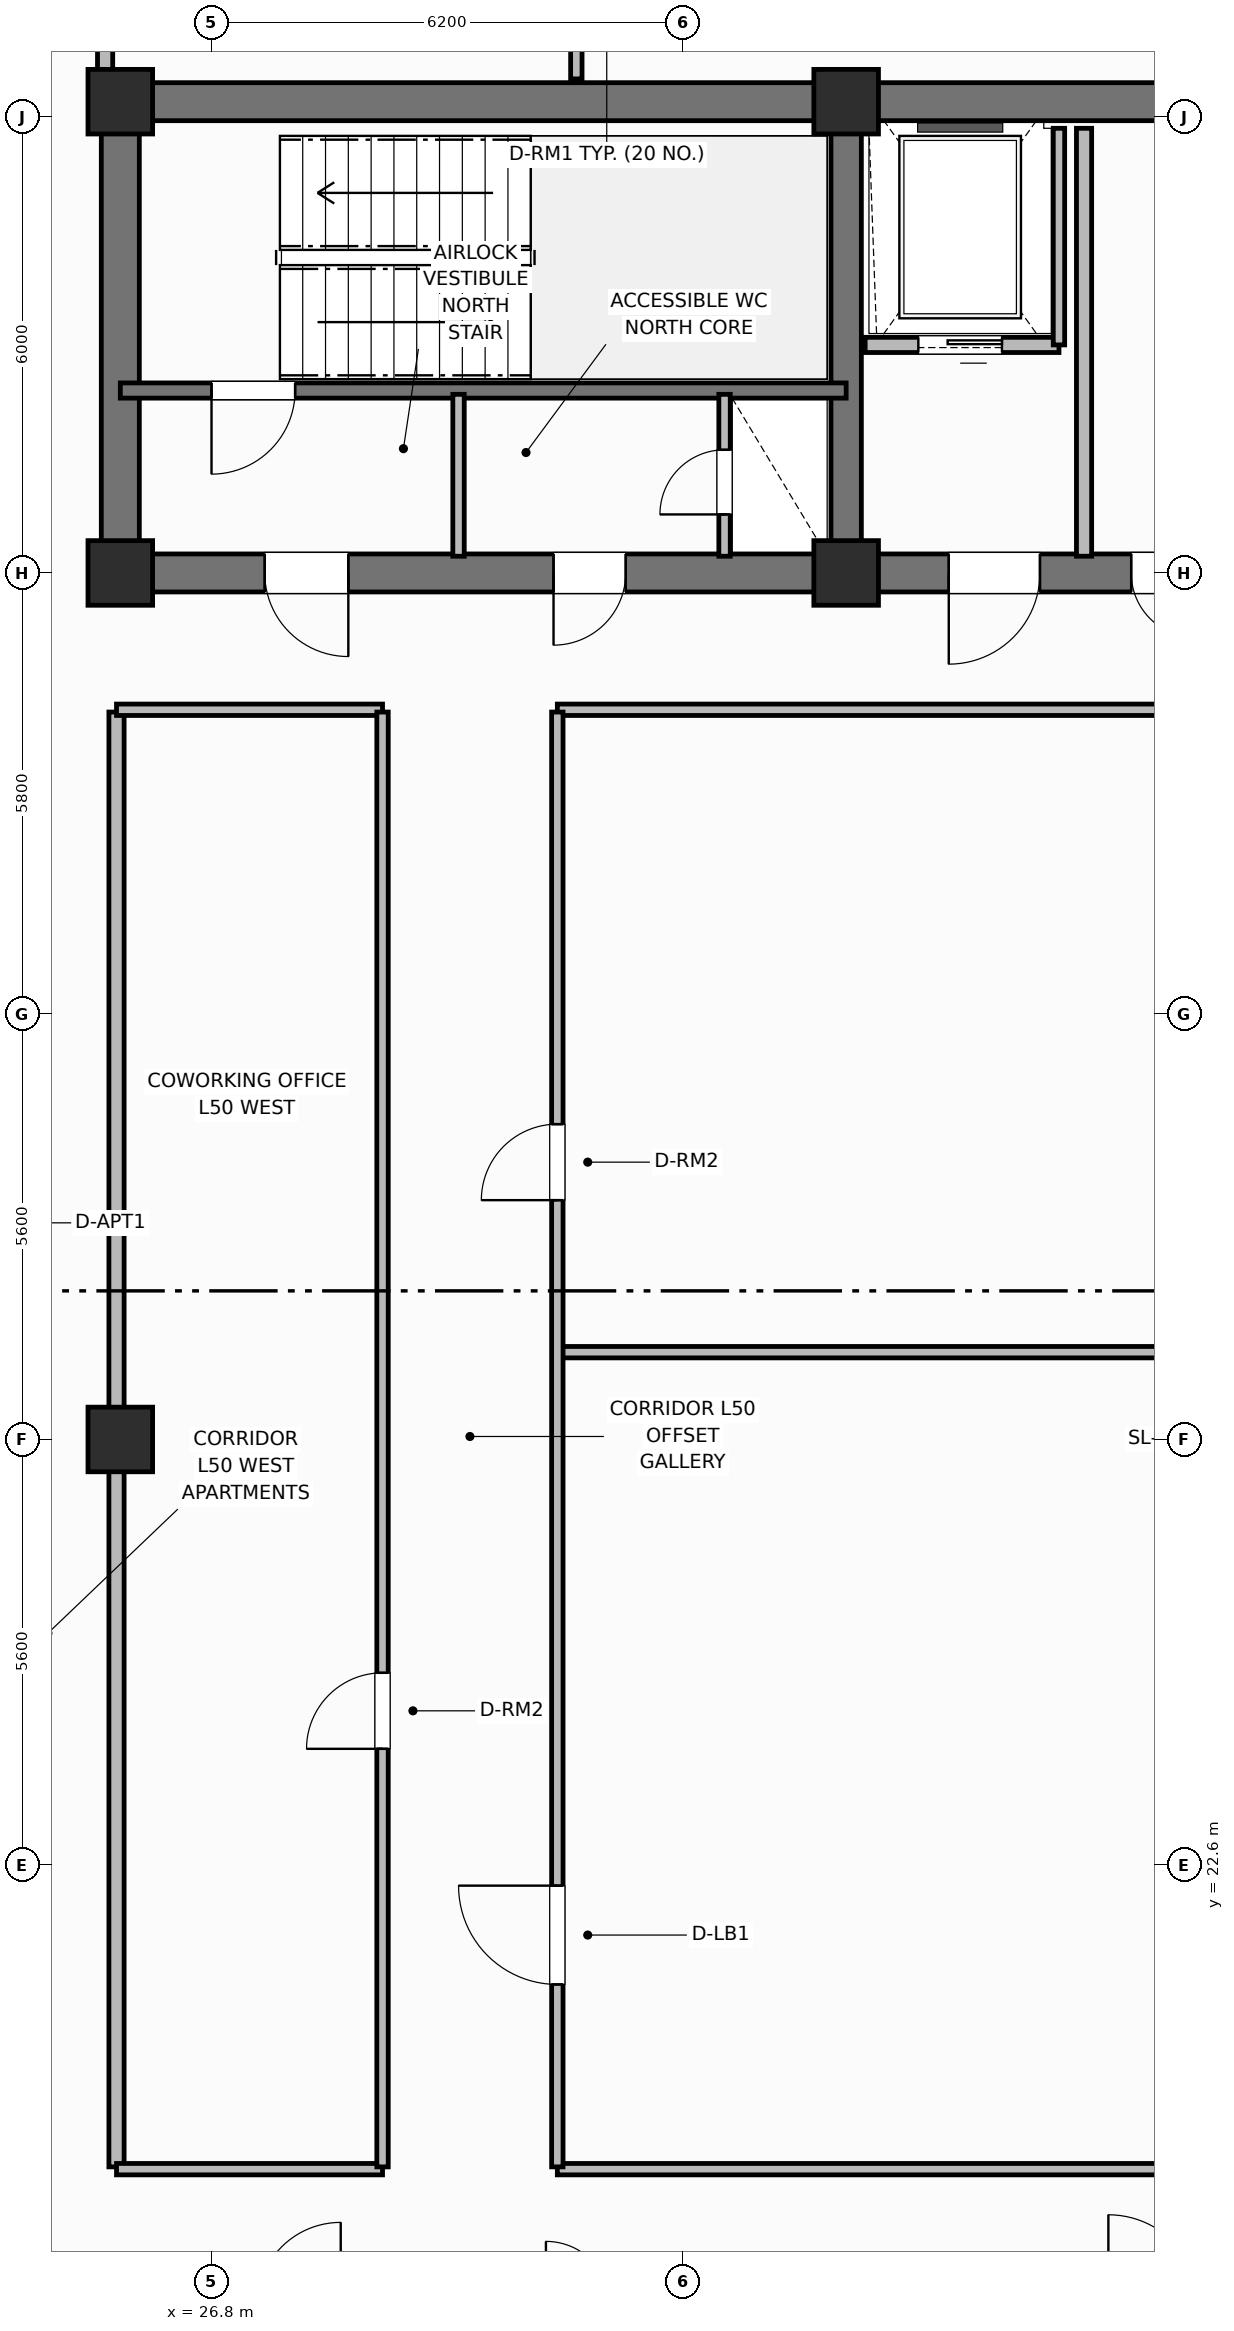
"""IFC4 building model, lengths in metres.
Left out: names, types, materials, properties, quantities, classifications, styles, units other than length and angle.
Written with IfcOpenShell. Run it as: python <this file> out.ifc"""

import sys

from ifc_helpers import new_model, si_unit, direction, frame, frame_2d, origin, origin_2d, place, context, subcontext, project, spatial, rectangle, extrude, element, fill, save


model = new_model("IFC4")
c1 = context("Model", 3, precision=1e-05, world=origin(), true_north=direction((0.0, 1.0)))
c2 = subcontext(c1, "Body", "Model", "MODEL_VIEW")
j1 = project(units=[si_unit("LENGTHUNIT", "METRE"), si_unit("PLANEANGLEUNIT", "RADIAN")], contexts=[c1])
p1 = place(None, origin())
s1 = spatial("IfcSite", under=j1, at=p1, CompositionType="ELEMENT")
p2 = place(p1, origin())
s2 = spatial("IfcBuilding", under=s1, at=p2, CompositionType="ELEMENT")
p3 = place(p2, frame((0.0, 0.0, 203.1)))
s3 = spatial("IfcBuildingStorey", under=s2, at=p3, CompositionType="ELEMENT", Elevation=203.1)
p4 = place(p3, frame((25.6, 45.8, 0.0), z_axis=(0.0, 0.0, 1.0), x_axis=(1.0, 0.0, 0.0)))
e1 = element("IfcWall", 1, at=p4, inside=s3, PredefinedType="SHEAR", context=c2, shape_type="SweptSolid", body=[
    extrude(rectangle(XDim=27.2, YDim=0.5, at=frame_2d((13.6, 0.0))), origin(), (0.0, 0.0, 1.0), 4.2),
])
p5 = place(p3, frame((25.6, 39.85, 0.0), z_axis=(0.0, 0.0, 1.0), x_axis=(0.0, 1.0, 0.0)))
e2 = element("IfcWall", 2, at=p5, inside=s3, PredefinedType="SHEAR", context=c2, shape_type="SweptSolid", body=[
    extrude(rectangle(XDim=5.7, YDim=0.5, at=frame_2d((2.85, 0.0))), origin(), (0.0, 0.0, 1.0), 4.2),
])
p6 = place(p3, frame((52.8, 39.6, 0.0), z_axis=(0.0, 0.0, 1.0), x_axis=(-1.0, 0.0, 0.0)))
e3 = element("IfcWall", 3, at=p6, inside=s3, PredefinedType="SHEAR", context=c2, shape_type="SweptSolid", body=[
    extrude(rectangle(XDim=27.2, YDim=0.5, at=frame_2d((13.6, 0.0))), origin(), (0.0, 0.0, 1.0), 4.2),
])
p7 = place(p6, frame((24.2, 0.0, 0.0)))
e4 = element("IfcOpeningElement", 4, at=p7, cuts=e3, PredefinedType="OPENING", context=c2, shape_type="SweptSolid", body=[
    extrude(rectangle(XDim=1.1, YDim=2.15, at=frame_2d((0.55, 1.075))), frame((0.0, 0.26, 0.0), z_axis=(0.0, -1.0, 0.0), x_axis=(1.0, 0.0, 0.0)), (0.0, 0.0, 1.0), 0.52),
])
p8 = place(p6, frame((20.55, 0.0, 0.0)))
e5 = element("IfcOpeningElement", 5, at=p8, cuts=e3, PredefinedType="OPENING", context=c2, shape_type="SweptSolid", body=[
    extrude(rectangle(XDim=0.95, YDim=2.1, at=frame_2d((0.475, 1.05))), frame((0.0, 0.26, 0.0), z_axis=(0.0, -1.0, 0.0), x_axis=(1.0, 0.0, 0.0)), (0.0, 0.0, 1.0), 0.52),
])
p9 = place(p6, frame((15.1, 0.0, 0.0)))
e6 = element("IfcOpeningElement", 6, at=p9, cuts=e3, PredefinedType="OPENING", context=c2, shape_type="SweptSolid", body=[
    extrude(rectangle(XDim=1.2, YDim=2.15, at=frame_2d((0.6, 1.075))), frame((0.0, 0.26, 0.0), z_axis=(0.0, -1.0, 0.0), x_axis=(1.0, 0.0, 0.0)), (0.0, 0.0, 1.0), 0.52),
])
p10 = place(p6, frame((13.05, 0.0, 0.0)))
e7 = element("IfcOpeningElement", 7, at=p10, cuts=e3, PredefinedType="OPENING", context=c2, shape_type="SweptSolid", body=[
    extrude(rectangle(XDim=0.85, YDim=2.1, at=frame_2d((0.425, 1.05))), frame((0.0, 0.26, 0.0), z_axis=(0.0, -1.0, 0.0), x_axis=(1.0, 0.0, 0.0)), (0.0, 0.0, 1.0), 0.52),
])
p11 = place(p6, frame((11.0, 0.0, 0.0)))
e8 = element("IfcOpeningElement", 8, at=p11, cuts=e3, PredefinedType="OPENING", context=c2, shape_type="SweptSolid", body=[
    extrude(rectangle(XDim=0.85, YDim=2.1, at=frame_2d((0.425, 1.05))), frame((0.0, 0.26, 0.0), z_axis=(0.0, -1.0, 0.0), x_axis=(1.0, 0.0, 0.0)), (0.0, 0.0, 1.0), 0.52),
])
p12 = place(p6, frame((7.35, 0.0, 0.0)))
e9 = element("IfcOpeningElement", 9, at=p12, cuts=e3, PredefinedType="OPENING", context=c2, shape_type="SweptSolid", body=[
    extrude(rectangle(XDim=0.85, YDim=2.1, at=frame_2d((0.425, 1.05))), frame((0.0, 0.26, 0.0), z_axis=(0.0, -1.0, 0.0), x_axis=(1.0, 0.0, 0.0)), (0.0, 0.0, 1.0), 0.52),
])
p13 = place(p6, frame((4.2, 0.0, 0.0)))
e10 = element("IfcOpeningElement", 10, at=p13, cuts=e3, PredefinedType="OPENING", context=c2, shape_type="SweptSolid", body=[
    extrude(rectangle(XDim=1.3, YDim=2.2, at=frame_2d((0.65, 1.1))), frame((0.0, 0.26, 0.0), z_axis=(0.0, -1.0, 0.0), x_axis=(1.0, 0.0, 0.0)), (0.0, 0.0, 1.0), 0.52),
])
p14 = place(p3, frame((35.15, 39.85, 0.0), z_axis=(0.0, 0.0, 1.0), x_axis=(0.0, 1.0, 0.0)))
e11 = element("IfcWall", 11, at=p14, inside=s3, PredefinedType="SHEAR", context=c2, shape_type="SweptSolid", body=[
    extrude(rectangle(XDim=5.7, YDim=0.4, at=frame_2d((2.85, 0.0))), origin(), (0.0, 0.0, 1.0), 4.2),
])
for number, where, z_axis, x_axis in (
    (12, (25.6, 39.6, 0.0), (0.0, 0.0, 1.0), (1.0, 0.0, 0.0)),
    (13, (25.6, 45.8, 0.0), (0.0, 0.0, 1.0), (1.0, 0.0, 0.0)),
    (14, (35.15, 39.6, 0.0), (0.0, 0.0, 1.0), (1.0, 0.0, 0.0)),
    (15, (35.15, 45.8, 0.0), (0.0, 0.0, 1.0), (1.0, 0.0, 0.0)),
    (16, (25.6, 28.2, 0.0), (0.0, 0.0, 1.0), (1.0, 0.0, 0.0)),
):
    element("IfcColumn", number, at=place(p3, frame(where, z_axis=z_axis, x_axis=x_axis)), inside=s3, PredefinedType="COLUMN", context=c2, shape_type="SweptSolid", body=[
        extrude(rectangle(XDim=0.85, YDim=0.85, at=origin_2d()), origin(), (0.0, 0.0, 1.0), 4.2),
    ])
p15 = place(p3, frame((35.15, 42.0, 0.0), z_axis=(0.0, 0.0, 1.0), x_axis=(-1.0, 0.0, 0.0)))
e17 = element("IfcWall", 17, at=p15, inside=s3, PredefinedType="SHEAR", context=c2, shape_type="SweptSolid", body=[
    extrude(rectangle(XDim=9.55, YDim=0.2, at=frame_2d((4.775, 0.0))), origin(), (0.0, 0.0, 1.0), 4.2),
])
p16 = place(p15, frame((7.25, 0.0, 0.0)))
e18 = element("IfcOpeningElement", 18, at=p16, cuts=e17, PredefinedType="OPENING", context=c2, shape_type="SweptSolid", body=[
    extrude(rectangle(XDim=1.1, YDim=2.15, at=frame_2d((0.55, 1.075))), frame((0.0, 0.11, 0.0), z_axis=(0.0, -1.0, 0.0), x_axis=(1.0, 0.0, 0.0)), (0.0, 0.0, 1.0), 0.22),
])
p17 = place(p3, frame((33.55, 39.82, 0.0), z_axis=(0.0, 0.0, 1.0), x_axis=(0.0, 1.0, 0.0)))
e19 = element("IfcWall", 19, at=p17, inside=s3, PredefinedType="PARTITIONING", context=c2, shape_type="SweptSolid", body=[
    extrude(rectangle(XDim=2.13, YDim=0.15, at=frame_2d((1.065, 0.0))), origin(), (0.0, 0.0, 1.0), 3.05),
])
p18 = place(p17, frame((0.55, 0.0, 0.0)))
e20 = element("IfcOpeningElement", 20, at=p18, cuts=e19, PredefinedType="OPENING", context=c2, shape_type="SweptSolid", body=[
    extrude(rectangle(XDim=0.85, YDim=2.05, at=frame_2d((0.425, 1.025))), frame((0.0, 0.085, 0.0), z_axis=(0.0, -1.0, 0.0), x_axis=(1.0, 0.0, 0.0)), (0.0, 0.0, 1.0), 0.17),
])
p19 = place(p3, frame((30.05, 39.82, 0.0), z_axis=(0.0, 0.0, 1.0), x_axis=(0.0, 1.0, 0.0)))
e21 = element("IfcWall", 21, at=p19, inside=s3, PredefinedType="PARTITIONING", context=c2, shape_type="SweptSolid", body=[
    extrude(rectangle(XDim=2.13, YDim=0.15, at=frame_2d((1.065, 0.0))), origin(), (0.0, 0.0, 1.0), 3.05),
])
p20 = place(p3, frame((37.95, 42.6, 0.0), z_axis=(0.0, 0.0, 1.0), x_axis=(-1.0, 0.0, 0.0)))
e22 = element("IfcWall", 22, at=p20, inside=s3, PredefinedType="PARTITIONING", context=c2, shape_type="SweptSolid", body=[
    extrude(rectangle(XDim=2.55, YDim=0.2, at=frame_2d((1.275, 0.0))), origin(), (0.0, 0.0, 1.0), 2.82),
])
p21 = place(p20, frame((0.75, 0.0, 0.0)))
e23 = element("IfcOpeningElement", 23, at=p21, cuts=e22, PredefinedType="OPENING", context=c2, shape_type="SweptSolid", body=[
    extrude(rectangle(XDim=1.1, YDim=2.15, at=frame_2d((0.55, 1.075))), frame((0.0, 0.11, 0.0), z_axis=(0.0, -1.0, 0.0), x_axis=(1.0, 0.0, 0.0)), (0.0, 0.0, 1.0), 0.22),
])
p22 = place(p3, frame((37.95, 42.6, 0.0), z_axis=(0.0, 0.0, 1.0), x_axis=(0.0, 1.0, 0.0)))
e24 = element("IfcWall", 24, at=p22, inside=s3, PredefinedType="PARTITIONING", context=c2, shape_type="SweptSolid", body=[
    extrude(rectangle(XDim=2.85, YDim=0.15, at=frame_2d((1.425, 0.0))), origin(), (0.0, 0.0, 1.0), 3.05),
])
p23 = place(p3, frame((38.28, 39.82, 0.0), z_axis=(0.0, 0.0, 1.0), x_axis=(0.0, 1.0, 0.0)))
e25 = element("IfcWall", 25, at=p23, inside=s3, PredefinedType="PARTITIONING", context=c2, shape_type="SweptSolid", body=[
    extrude(rectangle(XDim=5.63, YDim=0.2, at=frame_2d((2.815, 0.0))), origin(), (0.0, 0.0, 1.0), 3.05),
])
p24 = place(p3, frame((25.55, 18.63, 0.0), z_axis=(0.0, 0.0, 1.0), x_axis=(0.0, 1.0, 0.0)))
e26 = element("IfcWall", 26, at=p24, inside=s3, PredefinedType="PARTITIONING", context=c2, shape_type="SweptSolid", body=[
    extrude(rectangle(XDim=19.14, YDim=0.2, at=frame_2d((9.57, 0.0))), origin(), (0.0, 0.0, 1.0), 3.05),
])
p25 = place(p3, frame((25.55, 18.6, 0.0), z_axis=(0.0, 0.0, 1.0), x_axis=(1.0, 0.0, 0.0)))
e27 = element("IfcWall", 27, at=p25, inside=s3, PredefinedType="PARTITIONING", context=c2, shape_type="SweptSolid", body=[
    extrude(rectangle(XDim=3.5, YDim=0.15, at=frame_2d((1.75, 0.0))), origin(), (0.0, 0.0, 1.0), 3.05),
])
p26 = place(p3, frame((31.35, 18.6, 0.0), z_axis=(0.0, 0.0, 1.0), x_axis=(1.0, 0.0, 0.0)))
e28 = element("IfcWall", 28, at=p26, inside=s3, PredefinedType="PARTITIONING", context=c2, shape_type="SweptSolid", body=[
    extrude(rectangle(XDim=21.5, YDim=0.15, at=frame_2d((10.75, 0.0))), origin(), (0.0, 0.0, 1.0), 3.05),
])
p27 = place(p3, frame((25.55, 37.8, 0.0), z_axis=(0.0, 0.0, 1.0), x_axis=(1.0, 0.0, 0.0)))
e29 = element("IfcWall", 29, at=p27, inside=s3, PredefinedType="PARTITIONING", context=c2, shape_type="SweptSolid", body=[
    extrude(rectangle(XDim=3.5, YDim=0.15, at=frame_2d((1.75, 0.0))), origin(), (0.0, 0.0, 1.0), 3.05),
])
p28 = place(p3, frame((31.35, 37.8, 0.0), z_axis=(0.0, 0.0, 1.0), x_axis=(1.0, 0.0, 0.0)))
e30 = element("IfcWall", 30, at=p28, inside=s3, PredefinedType="PARTITIONING", context=c2, shape_type="SweptSolid", body=[
    extrude(rectangle(XDim=21.5, YDim=0.15, at=frame_2d((10.75, 0.0))), origin(), (0.0, 0.0, 1.0), 3.05),
])
p29 = place(p3, frame((31.38, 29.348, 0.0), z_axis=(0.0, 0.0, 1.0), x_axis=(1.0, 0.0, 0.0)))
e31 = element("IfcWall", 31, at=p29, inside=s3, PredefinedType="PARTITIONING", context=c2, shape_type="SweptSolid", body=[
    extrude(rectangle(XDim=21.42, YDim=0.15, at=frame_2d((10.71, 0.0))), origin(), (0.0, 0.0, 1.0), 3.05),
])
p30 = place(p3, frame((29.05, 18.63, 0.0), z_axis=(0.0, 0.0, 1.0), x_axis=(0.0, 1.0, 0.0)))
e32 = element("IfcWall", 32, at=p30, inside=s3, PredefinedType="PARTITIONING", context=c2, shape_type="SweptSolid", body=[
    extrude(rectangle(XDim=19.14, YDim=0.15, at=frame_2d((9.57, 0.0))), origin(), (0.0, 0.0, 1.0), 3.05),
])
p31 = place(p30, frame((5.5, 0.0, 0.0)))
e33 = element("IfcOpeningElement", 33, at=p31, cuts=e32, PredefinedType="OPENING", context=c2, shape_type="SweptSolid", body=[
    extrude(rectangle(XDim=1.0, YDim=2.15, at=frame_2d((0.5, 1.075))), frame((0.0, 0.085, 0.0), z_axis=(0.0, -1.0, 0.0), x_axis=(1.0, 0.0, 0.0)), (0.0, 0.0, 1.0), 0.17),
])
p32 = place(p3, frame((31.35, 18.63, 0.0), z_axis=(0.0, 0.0, 1.0), x_axis=(0.0, 1.0, 0.0)))
e34 = element("IfcWall", 34, at=p32, inside=s3, PredefinedType="PARTITIONING", context=c2, shape_type="SweptSolid", body=[
    extrude(rectangle(XDim=19.14, YDim=0.15, at=frame_2d((9.57, 0.0))), origin(), (0.0, 0.0, 1.0), 3.05),
])
p33 = place(p32, frame((2.4, 0.0, 0.0)))
e35 = element("IfcOpeningElement", 35, at=p33, cuts=e34, PredefinedType="OPENING", context=c2, shape_type="SweptSolid", body=[
    extrude(rectangle(XDim=1.3, YDim=2.2, at=frame_2d((0.65, 1.1))), frame((0.0, 0.085, 0.0), z_axis=(0.0, -1.0, 0.0), x_axis=(1.0, 0.0, 0.0)), (0.0, 0.0, 1.0), 0.17),
])
p34 = place(p32, frame((12.719, 0.0, 0.0)))
e36 = element("IfcOpeningElement", 36, at=p34, cuts=e34, PredefinedType="OPENING", context=c2, shape_type="SweptSolid", body=[
    extrude(rectangle(XDim=1.0, YDim=2.15, at=frame_2d((0.5, 1.075))), frame((0.0, 0.085, 0.0), z_axis=(0.0, -1.0, 0.0), x_axis=(1.0, 0.0, 0.0)), (0.0, 0.0, 1.0), 0.17),
])
p35 = place(p3, frame((31.6, 46.1, 0.0), z_axis=(0.0, 0.0, 1.0), x_axis=(0.0, 1.0, 0.0)))
e37 = element("IfcWall", 37, at=p35, inside=s3, PredefinedType="PARTITIONING", context=c2, shape_type="SweptSolid", body=[
    extrude(rectangle(XDim=3.43, YDim=0.15, at=frame_2d((1.715, 0.0))), origin(), (0.0, 0.0, 1.0), 3.05),
])
p36 = place(p35, frame((0.85, 0.0, 0.0)))
e38 = element("IfcOpeningElement", 38, at=p36, cuts=e37, PredefinedType="OPENING", context=c2, shape_type="SweptSolid", body=[
    extrude(rectangle(XDim=0.9, YDim=2.1, at=frame_2d((0.45, 1.05))), frame((0.0, 0.085, 0.0), z_axis=(0.0, -1.0, 0.0), x_axis=(1.0, 0.0, 0.0)), (0.0, 0.0, 1.0), 0.17),
])
p37 = place(p3, frame((25.4, 46.1, 0.0), z_axis=(0.0, 0.0, 1.0), x_axis=(0.0, 1.0, 0.0)))
e39 = element("IfcWall", 39, at=p37, inside=s3, PredefinedType="PARTITIONING", context=c2, shape_type="SweptSolid", body=[
    extrude(rectangle(XDim=2.68, YDim=0.2, at=frame_2d((1.34, 0.0))), origin(), (0.0, 0.0, 1.0), 3.05),
])
p38 = place(p37, frame((0.65, 0.0, 0.0)))
e40 = element("IfcOpeningElement", 40, at=p38, cuts=e39, PredefinedType="OPENING", context=c2, shape_type="SweptSolid", body=[
    extrude(rectangle(XDim=0.9, YDim=2.1, at=frame_2d((0.45, 1.05))), frame((0.0, 0.11, 0.0), z_axis=(0.0, -1.0, 0.0), x_axis=(1.0, 0.0, 0.0)), (0.0, 0.0, 1.0), 0.22),
])
p39 = place(p16, origin())
e41 = element("IfcDoor", 41, at=p39, inside=s3, OperationType="SINGLE_SWING_RIGHT", PredefinedType="DOOR", context=c2, shape_type="SweptSolid", body=[
    extrude(rectangle(XDim=1.1, YDim=2.15, at=frame_2d((0.55, 1.075))), frame((0.0, 0.025, 0.0), z_axis=(0.0, -1.0, 0.0), x_axis=(1.0, 0.0, 0.0)), (0.0, 0.0, 1.0), 0.05),
])
fill(e18, e41)
p40 = place(p18, origin())
e42 = element("IfcDoor", 42, at=p40, inside=s3, OperationType="SINGLE_SWING_LEFT", PredefinedType="TRAPDOOR", context=c2, shape_type="SweptSolid", body=[
    extrude(rectangle(XDim=0.85, YDim=2.05, at=frame_2d((0.425, 1.025))), frame((0.0, 0.025, 0.0), z_axis=(0.0, -1.0, 0.0), x_axis=(1.0, 0.0, 0.0)), (0.0, 0.0, 1.0), 0.05),
])
fill(e20, e42)
p41 = place(p21, origin())
e43 = element("IfcDoor", 43, at=p41, inside=s3, OperationType="SLIDING_TO_LEFT", PredefinedType="DOOR", context=c2, shape_type="SweptSolid", body=[
    extrude(rectangle(XDim=1.1, YDim=2.15, at=frame_2d((0.55, 1.075))), frame((0.0, 0.025, 0.0), z_axis=(0.0, -1.0, 0.0), x_axis=(1.0, 0.0, 0.0)), (0.0, 0.0, 1.0), 0.05),
])
fill(e23, e43)
p42 = place(p31, origin())
e44 = element("IfcDoor", 44, at=p42, inside=s3, OperationType="SINGLE_SWING_LEFT", PredefinedType="DOOR", context=c2, shape_type="SweptSolid", body=[
    extrude(rectangle(XDim=1.0, YDim=2.15, at=frame_2d((0.5, 1.075))), frame((0.0, 0.025, 0.0), z_axis=(0.0, -1.0, 0.0), x_axis=(1.0, 0.0, 0.0)), (0.0, 0.0, 1.0), 0.05),
])
fill(e33, e44)
p43 = place(p33, origin())
e45 = element("IfcDoor", 45, at=p43, inside=s3, OperationType="SINGLE_SWING_RIGHT", PredefinedType="DOOR", context=c2, shape_type="SweptSolid", body=[
    extrude(rectangle(XDim=1.3, YDim=2.2, at=frame_2d((0.65, 1.1))), frame((0.0, 0.025, 0.0), z_axis=(0.0, -1.0, 0.0), x_axis=(1.0, 0.0, 0.0)), (0.0, 0.0, 1.0), 0.05),
])
fill(e35, e45)
p44 = place(p34, origin())
e46 = element("IfcDoor", 46, at=p44, inside=s3, OperationType="SINGLE_SWING_LEFT", PredefinedType="DOOR", context=c2, shape_type="SweptSolid", body=[
    extrude(rectangle(XDim=1.0, YDim=2.15, at=frame_2d((0.5, 1.075))), frame((0.0, 0.025, 0.0), z_axis=(0.0, -1.0, 0.0), x_axis=(1.0, 0.0, 0.0)), (0.0, 0.0, 1.0), 0.05),
])
fill(e36, e46)
p45 = place(p7, origin())
e47 = element("IfcDoor", 47, at=p45, inside=s3, OperationType="SINGLE_SWING_LEFT", PredefinedType="DOOR", context=c2, shape_type="SweptSolid", body=[
    extrude(rectangle(XDim=1.1, YDim=2.15, at=frame_2d((0.55, 1.075))), frame((0.0, 0.025, 0.0), z_axis=(0.0, -1.0, 0.0), x_axis=(1.0, 0.0, 0.0)), (0.0, 0.0, 1.0), 0.05),
])
fill(e4, e47)
p46 = place(p8, origin())
e48 = element("IfcDoor", 48, at=p46, inside=s3, OperationType="SINGLE_SWING_RIGHT", PredefinedType="DOOR", context=c2, shape_type="SweptSolid", body=[
    extrude(rectangle(XDim=0.95, YDim=2.1, at=frame_2d((0.475, 1.05))), frame((0.0, 0.025, 0.0), z_axis=(0.0, -1.0, 0.0), x_axis=(1.0, 0.0, 0.0)), (0.0, 0.0, 1.0), 0.05),
])
fill(e5, e48)
p47 = place(p9, origin())
e49 = element("IfcDoor", 49, at=p47, inside=s3, OperationType="SINGLE_SWING_RIGHT", PredefinedType="DOOR", context=c2, shape_type="SweptSolid", body=[
    extrude(rectangle(XDim=1.2, YDim=2.15, at=frame_2d((0.6, 1.075))), frame((0.0, 0.025, 0.0), z_axis=(0.0, -1.0, 0.0), x_axis=(1.0, 0.0, 0.0)), (0.0, 0.0, 1.0), 0.05),
])
fill(e6, e49)
p48 = place(p10, origin())
e50 = element("IfcDoor", 50, at=p48, inside=s3, OperationType="SINGLE_SWING_LEFT", PredefinedType="DOOR", context=c2, shape_type="SweptSolid", body=[
    extrude(rectangle(XDim=0.85, YDim=2.1, at=frame_2d((0.425, 1.05))), frame((0.0, 0.025, 0.0), z_axis=(0.0, -1.0, 0.0), x_axis=(1.0, 0.0, 0.0)), (0.0, 0.0, 1.0), 0.05),
])
fill(e7, e50)
save(model, sys.argv[1])
